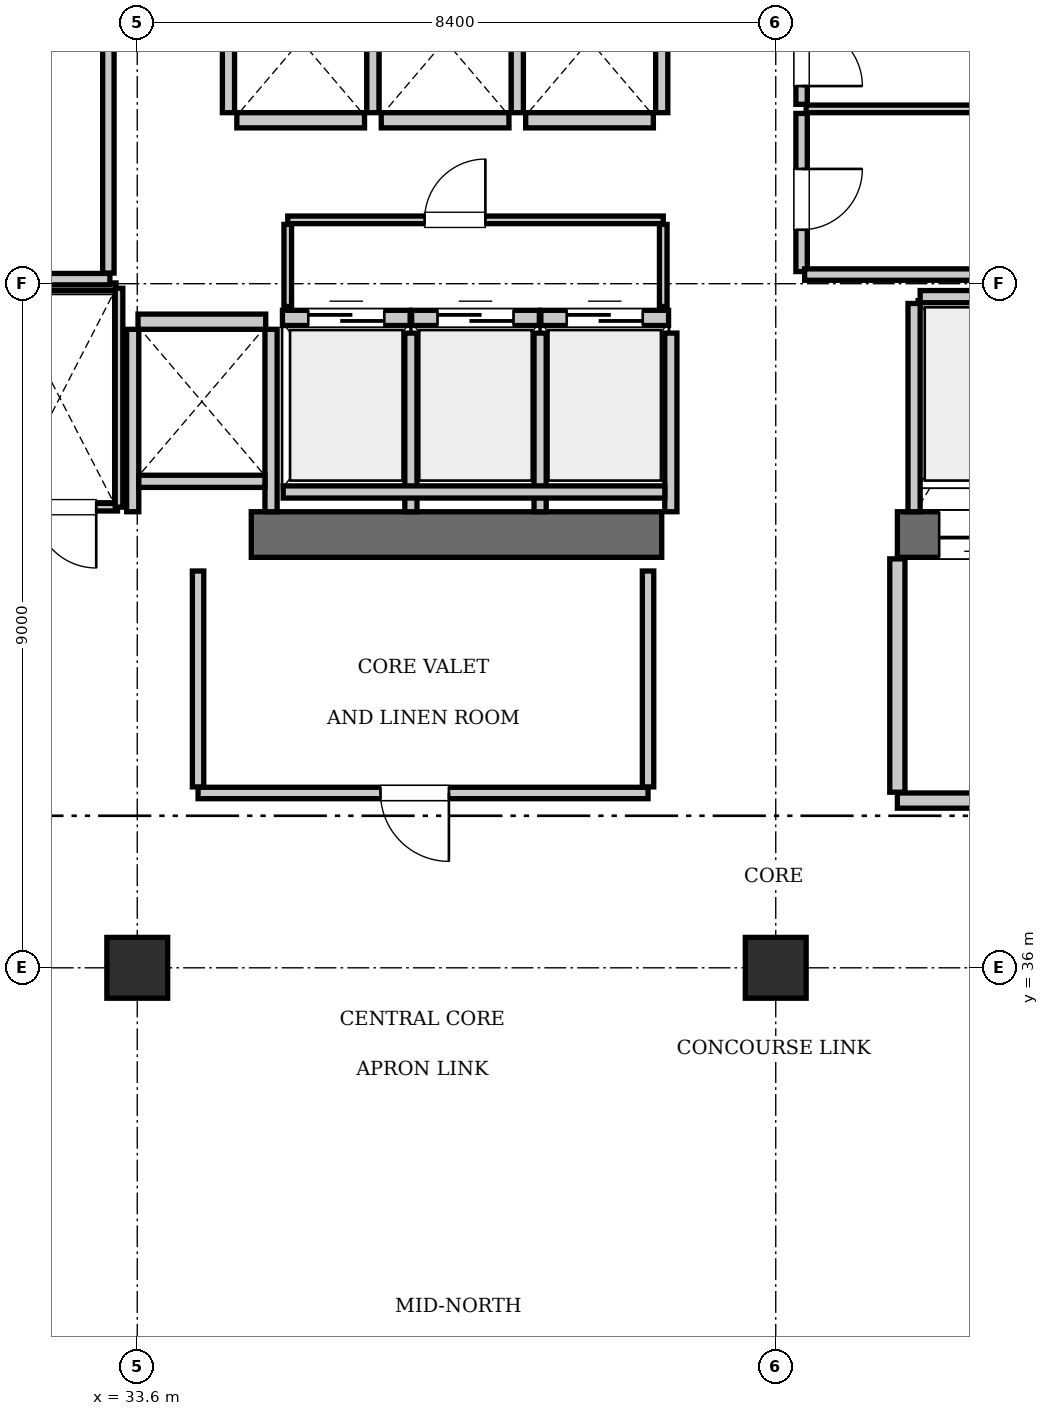
"""IFC4 building model, lengths in metres.
Left out: names, types, materials, properties, quantities, classifications, styles, units other than length and angle.
Written with IfcOpenShell. Run it as: python <this file> out.ifc"""

import sys

from ifc_helpers import new_model, si_unit, direction, frame, frame_2d, origin, origin_2d, place, context, subcontext, project, spatial, rectangle, extrude, element, fill, save


model = new_model("IFC4")
c1 = context("Model", 3, precision=1e-05, world=origin(), true_north=direction((0.0, 1.0)))
c2 = subcontext(c1, "Body", "Model", "MODEL_VIEW")
j1 = project(units=[si_unit("LENGTHUNIT", "METRE"), si_unit("PLANEANGLEUNIT", "RADIAN")], contexts=[c1])
p1 = place(None, origin())
s1 = spatial("IfcSite", under=j1, at=p1, CompositionType="ELEMENT")
p2 = place(p1, origin())
s2 = spatial("IfcBuilding", under=s1, at=p2, CompositionType="ELEMENT")
p3 = place(p2, frame((0.0, 0.0, 270.2)))
s3 = spatial("IfcBuildingStorey", under=s2, at=p3, CompositionType="ELEMENT", Elevation=270.2)
p4 = place(p3, frame((35.1, 41.7, 0.0), z_axis=(0.0, 0.0, 1.0), x_axis=(1.0, 0.0, 0.0)))
e1 = element("IfcWall", 1, at=p4, inside=s3, PredefinedType="SHEAR", context=c2, shape_type="SweptSolid", body=[
    extrude(rectangle(XDim=5.4, YDim=0.6, at=frame_2d((2.7, 0.0))), origin(), (0.0, 0.0, 1.0), 3.85),
])
p5 = place(p3, frame((43.6, 41.7, 0.0), z_axis=(0.0, 0.0, 1.0), x_axis=(1.0, 0.0, 0.0)))
e2 = element("IfcWall", 2, at=p5, inside=s3, PredefinedType="SHEAR", context=c2, shape_type="SweptSolid", body=[
    extrude(rectangle(XDim=6.8, YDim=0.6, at=frame_2d((3.4, 0.0))), origin(), (0.0, 0.0, 1.0), 3.85),
])
p6 = place(p5, frame((3.9, 0.0, 0.0)))
e3 = element("IfcOpeningElement", 3, at=p6, cuts=e2, PredefinedType="OPENING", context=c2, shape_type="SweptSolid", body=[
    extrude(rectangle(XDim=1.15, YDim=2.15, at=frame_2d((0.575, 1.075))), frame((0.0, 0.31, 0.0), z_axis=(0.0, -1.0, 0.0), x_axis=(1.0, 0.0, 0.0)), (0.0, 0.0, 1.0), 0.62),
])
p7 = place(p5, frame((0.55, 0.0, 0.0)))
e4 = element("IfcOpeningElement", 4, at=p7, cuts=e2, PredefinedType="OPENING", context=c2, shape_type="SweptSolid", body=[
    extrude(rectangle(XDim=1.1, YDim=2.2, at=frame_2d((0.55, 1.1))), frame((0.0, 0.31, 0.0), z_axis=(0.0, -1.0, 0.0), x_axis=(1.0, 0.0, 0.0)), (0.0, 0.0, 1.0), 0.62),
])
for number, where, z_axis, x_axis in (
    (5, (33.6, 36.0, 0.0), (0.0, 0.0, 1.0), (1.0, 0.0, 0.0)),
    (6, (42.0, 36.0, 0.0), (0.0, 0.0, 1.0), (1.0, 0.0, 0.0)),
):
    element("IfcColumn", number, at=place(p3, frame(where, z_axis=z_axis, x_axis=x_axis)), inside=s3, PredefinedType="COLUMN", context=c2, shape_type="SweptSolid", body=[
        extrude(rectangle(XDim=0.8, YDim=0.8, at=origin_2d()), origin(), (0.0, 0.0, 1.0), 3.85),
    ])
p8 = place(p3, frame((35.51, 44.55, 0.0), z_axis=(0.0, 0.0, 1.0), x_axis=(1.0, 0.0, 0.0)))
e7 = element("IfcWall", 7, at=p8, inside=s3, PredefinedType="SOLIDWALL", context=c2, shape_type="SweptSolid", body=[
    extrude(rectangle(XDim=1.68, YDim=0.2, at=frame_2d((0.84, 0.0))), origin(), (0.0, 0.0, 1.0), 3.61),
])
p9 = place(p8, frame((0.34, 0.0, 0.0)))
e8 = element("IfcOpeningElement", 8, at=p9, cuts=e7, PredefinedType="OPENING", context=c2, shape_type="SweptSolid", body=[
    extrude(rectangle(XDim=1.0, YDim=2.15, at=frame_2d((0.5, 1.075))), frame((0.0, 0.11, 0.0), z_axis=(0.0, -1.0, 0.0), x_axis=(1.0, 0.0, 0.0)), (0.0, 0.0, 1.0), 0.22),
])
p10 = place(p3, frame((37.21, 44.55, 0.0), z_axis=(0.0, 0.0, 1.0), x_axis=(1.0, 0.0, 0.0)))
e9 = element("IfcWall", 9, at=p10, inside=s3, PredefinedType="SOLIDWALL", context=c2, shape_type="SweptSolid", body=[
    extrude(rectangle(XDim=1.68, YDim=0.2, at=frame_2d((0.84, 0.0))), origin(), (0.0, 0.0, 1.0), 3.61),
])
p11 = place(p10, frame((0.34, 0.0, 0.0)))
e10 = element("IfcOpeningElement", 10, at=p11, cuts=e9, PredefinedType="OPENING", context=c2, shape_type="SweptSolid", body=[
    extrude(rectangle(XDim=1.0, YDim=2.15, at=frame_2d((0.5, 1.075))), frame((0.0, 0.11, 0.0), z_axis=(0.0, -1.0, 0.0), x_axis=(1.0, 0.0, 0.0)), (0.0, 0.0, 1.0), 0.22),
])
p12 = place(p3, frame((38.91, 44.55, 0.0), z_axis=(0.0, 0.0, 1.0), x_axis=(1.0, 0.0, 0.0)))
e11 = element("IfcWall", 11, at=p12, inside=s3, PredefinedType="SOLIDWALL", context=c2, shape_type="SweptSolid", body=[
    extrude(rectangle(XDim=1.68, YDim=0.2, at=frame_2d((0.84, 0.0))), origin(), (0.0, 0.0, 1.0), 3.61),
])
p13 = place(p12, frame((0.34, 0.0, 0.0)))
e12 = element("IfcOpeningElement", 12, at=p13, cuts=e11, PredefinedType="OPENING", context=c2, shape_type="SweptSolid", body=[
    extrude(rectangle(XDim=1.0, YDim=2.15, at=frame_2d((0.5, 1.075))), frame((0.0, 0.11, 0.0), z_axis=(0.0, -1.0, 0.0), x_axis=(1.0, 0.0, 0.0)), (0.0, 0.0, 1.0), 0.22),
])
p14 = place(p3, frame((34.91, 47.15, 0.0), z_axis=(0.0, 0.0, 1.0), x_axis=(1.0, 0.0, 0.0)))
e13 = element("IfcWall", 13, at=p14, inside=s3, PredefinedType="SOLIDWALL", context=c2, shape_type="SweptSolid", body=[
    extrude(rectangle(XDim=1.68, YDim=0.2, at=frame_2d((0.84, 0.0))), origin(), (0.0, 0.0, 1.0), 3.61),
])
for number, where, z_axis, x_axis in (
    (14, (36.81, 47.15, 0.0), (0.0, 0.0, 1.0), (1.0, 0.0, 0.0)),
    (15, (38.71, 47.15, 0.0), (0.0, 0.0, 1.0), (1.0, 0.0, 0.0)),
    (16, (33.61, 44.5, 0.0), (0.0, 0.0, 1.0), (1.0, 0.0, 0.0)),
):
    element("IfcWall", number, at=place(p3, frame(where, z_axis=z_axis, x_axis=x_axis)), inside=s3, PredefinedType="SOLIDWALL", context=c2, shape_type="SweptSolid", body=[
        extrude(rectangle(XDim=1.68, YDim=0.2, at=frame_2d((0.84, 0.0))), origin(), (0.0, 0.0, 1.0), 3.61),
    ])
p15 = place(p3, frame((43.9, 44.83, 0.0), z_axis=(0.0, 0.0, 1.0), x_axis=(1.0, 0.0, 0.0)))
e17 = element("IfcWall", 17, at=p15, inside=s3, PredefinedType="SOLIDWALL", context=c2, shape_type="SweptSolid", body=[
    extrude(rectangle(XDim=1.6, YDim=0.16, at=frame_2d((0.8, 0.0))), origin(), (0.0, 0.0, 1.0), 3.61),
])
p16 = place(p3, frame((43.82, 42.0, 0.0), z_axis=(0.0, 0.0, 1.0), x_axis=(0.0, 1.0, 0.0)))
e18 = element("IfcWall", 18, at=p16, inside=s3, PredefinedType="SOLIDWALL", context=c2, shape_type="SweptSolid", body=[
    extrude(rectangle(XDim=2.74, YDim=0.16, at=frame_2d((1.37, 0.0))), origin(), (0.0, 0.0, 1.0), 3.61),
])
for number, where, z_axis, x_axis in (
    (19, (37.2, 42.0, 0.0), (0.0, 0.0, 1.0), (0.0, 1.0, 0.0)),
    (20, (38.9, 42.0, 0.0), (0.0, 0.0, 1.0), (0.0, 1.0, 0.0)),
    (21, (40.62, 42.0, 0.0), (0.0, 0.0, 1.0), (0.0, 1.0, 0.0)),
):
    element("IfcWall", number, at=place(p3, frame(where, z_axis=z_axis, x_axis=x_axis)), inside=s3, PredefinedType="SOLIDWALL", context=c2, shape_type="SweptSolid", body=[
        extrude(rectangle(XDim=2.35, YDim=0.16, at=frame_2d((1.175, 0.0))), origin(), (0.0, 0.0, 1.0), 3.61),
    ])
p17 = place(p3, frame((35.52, 42.26, 0.0), z_axis=(0.0, 0.0, 1.0), x_axis=(1.0, 0.0, 0.0)))
e22 = element("IfcWall", 22, at=p17, inside=s3, PredefinedType="SOLIDWALL", context=c2, shape_type="SweptSolid", body=[
    extrude(rectangle(XDim=5.02, YDim=0.16, at=frame_2d((2.51, 0.0))), origin(), (0.0, 0.0, 1.0), 3.61),
])
for number, where, z_axis, x_axis in (
    (23, (34.8, 47.25, 0.0), (0.0, 0.0, 1.0), (0.0, 1.0, 0.0)),
    (24, (36.7, 47.25, 0.0), (0.0, 0.0, 1.0), (0.0, 1.0, 0.0)),
    (25, (38.6, 47.25, 0.0), (0.0, 0.0, 1.0), (0.0, 1.0, 0.0)),
    (26, (40.5, 47.25, 0.0), (0.0, 0.0, 1.0), (0.0, 1.0, 0.0)),
):
    element("IfcWall", number, at=place(p3, frame(where, z_axis=z_axis, x_axis=x_axis)), inside=s3, PredefinedType="SOLIDWALL", context=c2, shape_type="SweptSolid", body=[
        extrude(rectangle(XDim=2.19, YDim=0.16, at=frame_2d((1.095, 0.0))), origin(), (0.0, 0.0, 1.0), 3.61),
    ])
for number, where, z_axis, x_axis in (
    (27, (33.54, 42.0, 0.0), (0.0, 0.0, 1.0), (0.0, 1.0, 0.0)),
    (28, (35.36, 42.0, 0.0), (0.0, 0.0, 1.0), (0.0, 1.0, 0.0)),
):
    element("IfcWall", number, at=place(p3, frame(where, z_axis=z_axis, x_axis=x_axis)), inside=s3, PredefinedType="SOLIDWALL", context=c2, shape_type="SweptSolid", body=[
        extrude(rectangle(XDim=2.4, YDim=0.16, at=frame_2d((1.2, 0.0))), origin(), (0.0, 0.0, 1.0), 3.61),
    ])
p18 = place(p3, frame((33.62, 42.4, 0.0), z_axis=(0.0, 0.0, 1.0), x_axis=(1.0, 0.0, 0.0)))
e29 = element("IfcWall", 29, at=p18, inside=s3, PredefinedType="SOLIDWALL", context=c2, shape_type="SweptSolid", body=[
    extrude(rectangle(XDim=1.66, YDim=0.16, at=frame_2d((0.83, 0.0))), origin(), (0.0, 0.0, 1.0), 3.61),
])
p19 = place(p3, frame((43.6, 38.2, 0.0), z_axis=(0.0, 0.0, 1.0), x_axis=(1.0, 0.0, 0.0)))
e30 = element("IfcWall", 30, at=p19, inside=s3, PredefinedType="PARTITIONING", context=c2, shape_type="SweptSolid", body=[
    extrude(rectangle(XDim=5.8, YDim=0.2, at=frame_2d((2.9, 0.0))), origin(), (0.0, 0.0, 1.0), 3.61),
])
p20 = place(p19, frame((2.3, 0.0, 0.0)))
e31 = element("IfcOpeningElement", 31, at=p20, cuts=e30, PredefinedType="OPENING", context=c2, shape_type="SweptSolid", body=[
    extrude(rectangle(XDim=1.15, YDim=2.15, at=frame_2d((0.575, 1.075))), frame((0.0, 0.11, 0.0), z_axis=(0.0, -1.0, 0.0), x_axis=(1.0, 0.0, 0.0)), (0.0, 0.0, 1.0), 0.22),
])
p21 = place(p3, frame((43.6, 38.31, 0.0), z_axis=(0.0, 0.0, 1.0), x_axis=(0.0, 1.0, 0.0)))
e32 = element("IfcWall", 32, at=p21, inside=s3, PredefinedType="PARTITIONING", context=c2, shape_type="SweptSolid", body=[
    extrude(rectangle(XDim=3.07, YDim=0.2, at=frame_2d((1.535, 0.0))), origin(), (0.0, 0.0, 1.0), 3.61),
])
p22 = place(p3, frame((32.02, 42.06, 0.0), z_axis=(0.0, 0.0, 1.0), x_axis=(1.0, 0.0, 0.0)))
e33 = element("IfcWall", 33, at=p22, inside=s3, PredefinedType="PARTITIONING", context=c2, shape_type="SweptSolid", body=[
    extrude(rectangle(XDim=1.32, YDim=0.1, at=frame_2d((0.66, 0.0))), origin(), (0.0, 0.0, 1.0), 3.61),
])
p23 = place(p22, frame((0.24, 0.0, 0.0)))
e34 = element("IfcOpeningElement", 34, at=p23, cuts=e33, PredefinedType="OPENING", context=c2, shape_type="SweptSolid", body=[
    extrude(rectangle(XDim=0.8, YDim=2.05, at=frame_2d((0.4, 1.025))), frame((0.0, 0.06, 0.0), z_axis=(0.0, -1.0, 0.0), x_axis=(1.0, 0.0, 0.0)), (0.0, 0.0, 1.0), 0.12),
])
p24 = place(p3, frame((31.84, 44.96, 0.0), z_axis=(0.0, 0.0, 1.0), x_axis=(1.0, 0.0, 0.0)))
e35 = element("IfcWall", 35, at=p24, inside=s3, PredefinedType="PARTITIONING", context=c2, shape_type="SweptSolid", body=[
    extrude(rectangle(XDim=1.48, YDim=0.1, at=frame_2d((0.74, 0.0))), origin(), (0.0, 0.0, 1.0), 3.61),
])
p25 = place(p3, frame((33.36, 42.06, 0.0), z_axis=(0.0, 0.0, 1.0), x_axis=(0.0, 1.0, 0.0)))
e36 = element("IfcWall", 36, at=p25, inside=s3, PredefinedType="PARTITIONING", context=c2, shape_type="SweptSolid", body=[
    extrude(rectangle(XDim=2.88, YDim=0.1, at=frame_2d((1.44, 0.0))), origin(), (0.0, 0.0, 1.0), 3.61),
])
p26 = place(p3, frame((35.58, 45.84, 0.0), z_axis=(0.0, 0.0, 1.0), x_axis=(1.0, 0.0, 0.0)))
e37 = element("IfcWall", 37, at=p26, inside=s3, PredefinedType="PARTITIONING", context=c2, shape_type="SweptSolid", body=[
    extrude(rectangle(XDim=4.94, YDim=0.1, at=frame_2d((2.47, 0.0))), origin(), (0.0, 0.0, 1.0), 3.61),
])
p27 = place(p26, frame((1.8, 0.0, 0.0)))
e38 = element("IfcOpeningElement", 38, at=p27, cuts=e37, PredefinedType="OPENING", context=c2, shape_type="SweptSolid", body=[
    extrude(rectangle(XDim=0.8, YDim=2.05, at=frame_2d((0.4, 1.025))), frame((0.0, 0.06, 0.0), z_axis=(0.0, -1.0, 0.0), x_axis=(1.0, 0.0, 0.0)), (0.0, 0.0, 1.0), 0.12),
])
for number, where, z_axis, x_axis in (
    (39, (35.58, 44.7, 0.0), (0.0, 0.0, 1.0), (0.0, 1.0, 0.0)),
    (40, (40.52, 44.7, 0.0), (0.0, 0.0, 1.0), (0.0, 1.0, 0.0)),
):
    element("IfcWall", number, at=place(p3, frame(where, z_axis=z_axis, x_axis=x_axis)), inside=s3, PredefinedType="PARTITIONING", context=c2, shape_type="SweptSolid", body=[
        extrude(rectangle(XDim=1.08, YDim=0.1, at=frame_2d((0.54, 0.0))), origin(), (0.0, 0.0, 1.0), 3.61),
    ])
p28 = place(p3, frame((30.06, 45.06, 0.0), z_axis=(0.0, 0.0, 1.0), x_axis=(1.0, 0.0, 0.0)))
e41 = element("IfcWall", 41, at=p28, inside=s3, PredefinedType="PARTITIONING", context=c2, shape_type="SweptSolid", body=[
    extrude(rectangle(XDim=3.18, YDim=0.15, at=frame_2d((1.59, 0.0))), origin(), (0.0, 0.0, 1.0), 3.61),
])
p29 = place(p3, frame((33.22, 45.14, 0.0), z_axis=(0.0, 0.0, 1.0), x_axis=(0.0, 1.0, 0.0)))
e42 = element("IfcWall", 42, at=p29, inside=s3, PredefinedType="PARTITIONING", context=c2, shape_type="SweptSolid", body=[
    extrude(rectangle(XDim=4.16, YDim=0.15, at=frame_2d((2.08, 0.0))), origin(), (0.0, 0.0, 1.0), 3.61),
])
p30 = place(p3, frame((42.34, 45.16, 0.0), z_axis=(0.0, 0.0, 1.0), x_axis=(0.0, 1.0, 0.0)))
e43 = element("IfcWall", 43, at=p30, inside=s3, PredefinedType="PARTITIONING", context=c2, shape_type="SweptSolid", body=[
    extrude(rectangle(XDim=2.08, YDim=0.15, at=frame_2d((1.04, 0.0))), origin(), (0.0, 0.0, 1.0), 3.61),
])
p31 = place(p30, frame((0.55, 0.0, 0.0)))
e44 = element("IfcOpeningElement", 44, at=p31, cuts=e43, PredefinedType="OPENING", context=c2, shape_type="SweptSolid", body=[
    extrude(rectangle(XDim=0.8, YDim=2.05, at=frame_2d((0.4, 1.025))), frame((0.0, 0.085, 0.0), z_axis=(0.0, -1.0, 0.0), x_axis=(1.0, 0.0, 0.0)), (0.0, 0.0, 1.0), 0.17),
])
p32 = place(p3, frame((42.34, 47.36, 0.0), z_axis=(0.0, 0.0, 1.0), x_axis=(0.0, 1.0, 0.0)))
e45 = element("IfcWall", 45, at=p32, inside=s3, PredefinedType="PARTITIONING", context=c2, shape_type="SweptSolid", body=[
    extrude(rectangle(XDim=2.06, YDim=0.15, at=frame_2d((1.03, 0.0))), origin(), (0.0, 0.0, 1.0), 3.61),
])
p33 = place(p32, frame((0.24, 0.0, 0.0)))
e46 = element("IfcOpeningElement", 46, at=p33, cuts=e45, PredefinedType="OPENING", context=c2, shape_type="SweptSolid", body=[
    extrude(rectangle(XDim=0.8, YDim=2.05, at=frame_2d((0.4, 1.025))), frame((0.0, 0.085, 0.0), z_axis=(0.0, -1.0, 0.0), x_axis=(1.0, 0.0, 0.0)), (0.0, 0.0, 1.0), 0.17),
])
p34 = place(p3, frame((42.4, 47.3, 0.0), z_axis=(0.0, 0.0, 1.0), x_axis=(1.0, 0.0, 0.0)))
e47 = element("IfcWall", 47, at=p34, inside=s3, PredefinedType="PARTITIONING", context=c2, shape_type="SweptSolid", body=[
    extrude(rectangle(XDim=3.1, YDim=0.1, at=frame_2d((1.55, 0.0))), origin(), (0.0, 0.0, 1.0), 3.61),
])
p35 = place(p3, frame((42.38, 45.12, 0.0), z_axis=(0.0, 0.0, 1.0), x_axis=(1.0, 0.0, 0.0)))
e48 = element("IfcWall", 48, at=p35, inside=s3, PredefinedType="PARTITIONING", context=c2, shape_type="SweptSolid", body=[
    extrude(rectangle(XDim=3.14, YDim=0.15, at=frame_2d((1.57, 0.0))), origin(), (0.0, 0.0, 1.0), 3.61),
])
p36 = place(p3, frame((34.4, 38.3, 0.0), z_axis=(0.0, 0.0, 1.0), x_axis=(1.0, 0.0, 0.0)))
e49 = element("IfcWall", 49, at=p36, inside=s3, PredefinedType="PARTITIONING", context=c2, shape_type="SweptSolid", body=[
    extrude(rectangle(XDim=5.92, YDim=0.15, at=frame_2d((2.96, 0.0))), origin(), (0.0, 0.0, 1.0), 3.61),
])
p37 = place(p36, frame((2.4, 0.0, 0.0)))
e50 = element("IfcOpeningElement", 50, at=p37, cuts=e49, PredefinedType="OPENING", context=c2, shape_type="SweptSolid", body=[
    extrude(rectangle(XDim=0.9, YDim=2.1, at=frame_2d((0.45, 1.05))), frame((0.0, 0.085, 0.0), z_axis=(0.0, -1.0, 0.0), x_axis=(1.0, 0.0, 0.0)), (0.0, 0.0, 1.0), 0.17),
])
for number, where, z_axis, x_axis in (
    (51, (34.4, 38.38, 0.0), (0.0, 0.0, 1.0), (0.0, 1.0, 0.0)),
    (52, (40.32, 38.38, 0.0), (0.0, 0.0, 1.0), (0.0, 1.0, 0.0)),
):
    element("IfcWall", number, at=place(p3, frame(where, z_axis=z_axis, x_axis=x_axis)), inside=s3, PredefinedType="PARTITIONING", context=c2, shape_type="SweptSolid", body=[
        extrude(rectangle(XDim=2.84, YDim=0.15, at=frame_2d((1.42, 0.0))), origin(), (0.0, 0.0, 1.0), 3.61),
    ])
p38 = place(p9, origin())
e53 = element("IfcDoor", 53, at=p38, inside=s3, OperationType="SLIDING_TO_LEFT", PredefinedType="DOOR", context=c2, shape_type="SweptSolid", body=[
    extrude(rectangle(XDim=1.0, YDim=2.15, at=frame_2d((0.5, 1.075))), frame((0.0, 0.025, 0.0), z_axis=(0.0, -1.0, 0.0), x_axis=(1.0, 0.0, 0.0)), (0.0, 0.0, 1.0), 0.05),
])
fill(e8, e53)
p39 = place(p11, origin())
e54 = element("IfcDoor", 54, at=p39, inside=s3, OperationType="SLIDING_TO_LEFT", PredefinedType="DOOR", context=c2, shape_type="SweptSolid", body=[
    extrude(rectangle(XDim=1.0, YDim=2.15, at=frame_2d((0.5, 1.075))), frame((0.0, 0.025, 0.0), z_axis=(0.0, -1.0, 0.0), x_axis=(1.0, 0.0, 0.0)), (0.0, 0.0, 1.0), 0.05),
])
fill(e10, e54)
p40 = place(p13, origin())
e55 = element("IfcDoor", 55, at=p40, inside=s3, OperationType="SLIDING_TO_LEFT", PredefinedType="DOOR", context=c2, shape_type="SweptSolid", body=[
    extrude(rectangle(XDim=1.0, YDim=2.15, at=frame_2d((0.5, 1.075))), frame((0.0, 0.025, 0.0), z_axis=(0.0, -1.0, 0.0), x_axis=(1.0, 0.0, 0.0)), (0.0, 0.0, 1.0), 0.05),
])
fill(e12, e55)
p41 = place(p7, frame((1.1, 0.0, 0.0), z_axis=(0.0, 0.0, 1.0), x_axis=(-1.0, 0.0, 0.0)))
e56 = element("IfcDoor", 56, at=p41, inside=s3, OperationType="SLIDING_TO_LEFT", PredefinedType="DOOR", context=c2, shape_type="SweptSolid", body=[
    extrude(rectangle(XDim=1.1, YDim=2.2, at=frame_2d((0.55, 1.1))), frame((0.0, 0.025, 0.0), z_axis=(0.0, -1.0, 0.0), x_axis=(1.0, 0.0, 0.0)), (0.0, 0.0, 1.0), 0.05),
])
fill(e4, e56)
p42 = place(p23, frame((0.8, 0.0, 0.0), z_axis=(0.0, 0.0, 1.0), x_axis=(-1.0, 0.0, 0.0)))
e57 = element("IfcDoor", 57, at=p42, inside=s3, OperationType="SINGLE_SWING_LEFT", PredefinedType="DOOR", context=c2, shape_type="SweptSolid", body=[
    extrude(rectangle(XDim=0.8, YDim=2.05, at=frame_2d((0.4, 1.025))), frame((0.0, 0.025, 0.0), z_axis=(0.0, -1.0, 0.0), x_axis=(1.0, 0.0, 0.0)), (0.0, 0.0, 1.0), 0.05),
])
fill(e34, e57)
p43 = place(p27, origin())
e58 = element("IfcDoor", 58, at=p43, inside=s3, OperationType="SINGLE_SWING_RIGHT", PredefinedType="DOOR", context=c2, shape_type="SweptSolid", body=[
    extrude(rectangle(XDim=0.8, YDim=2.05, at=frame_2d((0.4, 1.025))), frame((0.0, 0.025, 0.0), z_axis=(0.0, -1.0, 0.0), x_axis=(1.0, 0.0, 0.0)), (0.0, 0.0, 1.0), 0.05),
])
fill(e38, e58)
p44 = place(p31, frame((0.8, 0.0, 0.0), z_axis=(0.0, 0.0, 1.0), x_axis=(-1.0, 0.0, 0.0)))
e59 = element("IfcDoor", 59, at=p44, inside=s3, OperationType="SINGLE_SWING_LEFT", PredefinedType="DOOR", context=c2, shape_type="SweptSolid", body=[
    extrude(rectangle(XDim=0.8, YDim=2.05, at=frame_2d((0.4, 1.025))), frame((0.0, 0.025, 0.0), z_axis=(0.0, -1.0, 0.0), x_axis=(1.0, 0.0, 0.0)), (0.0, 0.0, 1.0), 0.05),
])
fill(e44, e59)
p45 = place(p33, frame((0.8, 0.0, 0.0), z_axis=(0.0, 0.0, 1.0), x_axis=(-1.0, 0.0, 0.0)))
e60 = element("IfcDoor", 60, at=p45, inside=s3, OperationType="SINGLE_SWING_RIGHT", PredefinedType="DOOR", context=c2, shape_type="SweptSolid", body=[
    extrude(rectangle(XDim=0.8, YDim=2.05, at=frame_2d((0.4, 1.025))), frame((0.0, 0.025, 0.0), z_axis=(0.0, -1.0, 0.0), x_axis=(1.0, 0.0, 0.0)), (0.0, 0.0, 1.0), 0.05),
])
fill(e46, e60)
p46 = place(p37, frame((0.9, 0.0, 0.0), z_axis=(0.0, 0.0, 1.0), x_axis=(-1.0, 0.0, 0.0)))
e61 = element("IfcDoor", 61, at=p46, inside=s3, OperationType="SINGLE_SWING_LEFT", PredefinedType="DOOR", context=c2, shape_type="SweptSolid", body=[
    extrude(rectangle(XDim=0.9, YDim=2.1, at=frame_2d((0.45, 1.05))), frame((0.0, 0.025, 0.0), z_axis=(0.0, -1.0, 0.0), x_axis=(1.0, 0.0, 0.0)), (0.0, 0.0, 1.0), 0.05),
])
fill(e50, e61)
save(model, sys.argv[1])
